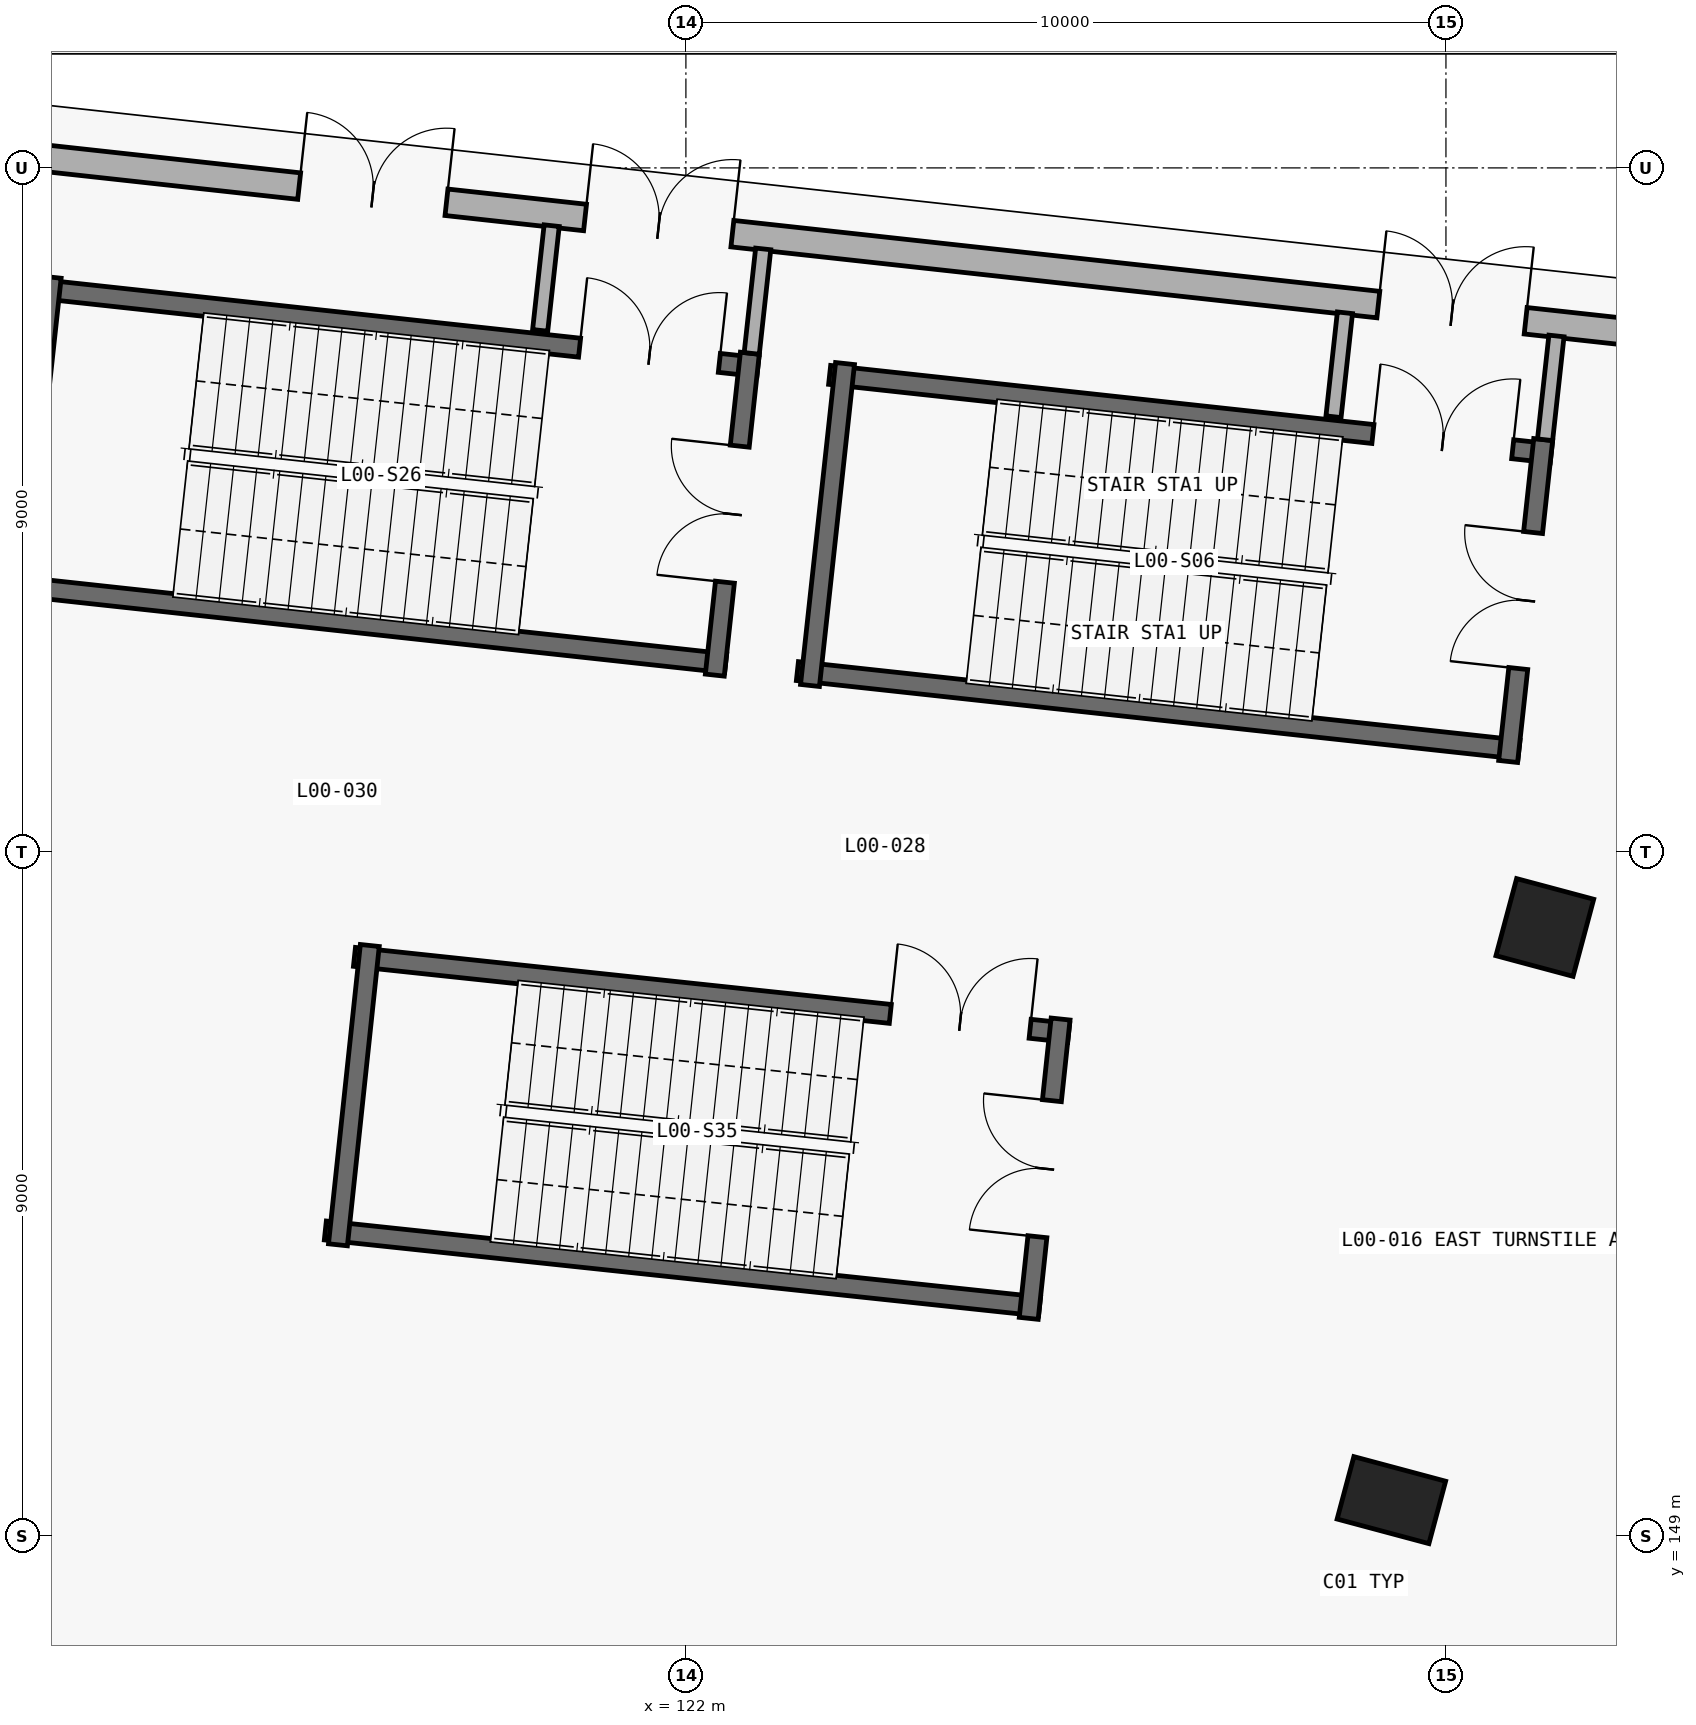
"""IFC4 building model, lengths in metres.
Left out: names, types, materials, properties, quantities, classifications, styles, units other than length and angle.
Written with IfcOpenShell. Run it as: python <this file> out.ifc"""

import sys

from ifc_helpers import new_model, si_unit, direction, frame, frame_2d, origin, origin_2d, place, context, subcontext, project, spatial, rectangle, extrude, element, fill, save


model = new_model("IFC4")
c1 = context("Model", 3, precision=1e-05, world=origin(), true_north=direction((0.0, 1.0)))
c2 = subcontext(c1, "Body", "Model", "MODEL_VIEW")
j1 = project(units=[si_unit("LENGTHUNIT", "METRE"), si_unit("PLANEANGLEUNIT", "RADIAN")], contexts=[c1])
p1 = place(None, origin())
s1 = spatial("IfcSite", under=j1, at=p1, CompositionType="ELEMENT")
p2 = place(p1, origin())
s2 = spatial("IfcBuilding", under=s1, at=p2, CompositionType="ELEMENT")
p3 = place(p2, origin())
s3 = spatial("IfcBuildingStorey", under=s2, at=p3, CompositionType="ELEMENT", Elevation=0.0)
p4 = place(p3, frame((131.282, 149.473, 0.0), z_axis=(0.0, 0.0, 1.0), x_axis=(0.258819045103, 0.965925826289, 0.0)))
e1 = element("IfcColumn", 1, at=p4, inside=s3, PredefinedType="COLUMN", context=c2, shape_type="SweptSolid", body=[
    extrude(rectangle(XDim=0.85, YDim=1.25, at=origin_2d()), origin(), (0.0, 0.0, 1.0), 5.4),
])
p5 = place(p3, frame((133.301, 157.007, 0.0), z_axis=(0.0, 0.0, 1.0), x_axis=(0.258819045103, 0.965925826289, 0.0)))
e2 = element("IfcColumn", 2, at=p5, inside=s3, PredefinedType="COLUMN", context=c2, shape_type="SweptSolid", body=[
    extrude(rectangle(XDim=1.05, YDim=1.05, at=origin_2d()), origin(), (0.0, 0.0, 1.0), 5.4),
])
p6 = place(p3, frame((112.525, 167.242, 0.0), z_axis=(0.0, 0.0, 1.0), x_axis=(0.994028735725, -0.10911861689, 0.0)))
e3 = element("IfcWall", 3, at=p6, inside=s3, PredefinedType="STANDARD", context=c2, shape_type="SweptSolid", body=[
    extrude(rectangle(XDim=22.452, YDim=0.35, at=frame_2d((11.226, 0.0))), origin(), (0.0, 0.0, 1.0), 4.165),
])
p7 = place(p6, frame((18.697, 0.0, 0.0)))
e4 = element("IfcOpeningElement", 4, at=p7, cuts=e3, PredefinedType="OPENING", context=c2, shape_type="SweptSolid", body=[
    extrude(rectangle(XDim=1.95, YDim=2.25, at=frame_2d((0.975, 1.125))), frame((0.0, 0.185, 0.0), z_axis=(0.0, -1.0, 0.0), x_axis=(1.0, 0.0, 0.0)), (0.0, 0.0, 1.0), 0.37),
])
p8 = place(p6, frame((8.197, 0.0, 0.0)))
e5 = element("IfcOpeningElement", 5, at=p8, cuts=e3, PredefinedType="OPENING", context=c2, shape_type="SweptSolid", body=[
    extrude(rectangle(XDim=1.95, YDim=2.25, at=frame_2d((0.975, 1.125))), frame((0.0, 0.185, 0.0), z_axis=(0.0, -1.0, 0.0), x_axis=(1.0, 0.0, 0.0)), (0.0, 0.0, 1.0), 0.37),
])
p9 = place(p6, frame((4.413, 0.0, 0.0)))
e6 = element("IfcOpeningElement", 6, at=p9, cuts=e3, PredefinedType="OPENING", context=c2, shape_type="SweptSolid", body=[
    extrude(rectangle(XDim=1.95, YDim=2.25, at=frame_2d((0.975, 1.125))), frame((0.0, 0.185, 0.0), z_axis=(0.0, -1.0, 0.0), x_axis=(1.0, 0.0, 0.0)), (0.0, 0.0, 1.0), 0.37),
])
p10 = place(p3, frame((123.891, 164.277, 0.0), z_axis=(0.0, 0.0, 1.0), x_axis=(0.994127555169, -0.108214620337, 0.0)))
e7 = element("IfcWall", 7, at=p10, inside=s3, PredefinedType="SHEAR", context=c2, shape_type="SweptSolid", body=[
    extrude(rectangle(XDim=9.55, YDim=0.25, at=frame_2d((4.775, 0.0))), origin(), (0.0, 0.0, 1.0), 5.1),
])
p11 = place(p10, frame((7.19, 0.0, 0.0)))
e8 = element("IfcOpeningElement", 8, at=p11, cuts=e7, PredefinedType="OPENING", context=c2, shape_type="SweptSolid", body=[
    extrude(rectangle(XDim=1.85, YDim=2.3, at=frame_2d((0.925, 1.15))), frame((0.0, 0.135, 0.0), z_axis=(0.0, -1.0, 0.0), x_axis=(1.0, 0.0, 0.0)), (0.0, 0.0, 1.0), 0.27),
])
p12 = place(p3, frame((123.467, 160.38, 0.0), z_axis=(0.0, 0.0, 1.0), x_axis=(0.994127555169, -0.108214620337, 0.0)))
e9 = element("IfcWall", 9, at=p12, inside=s3, PredefinedType="SHEAR", context=c2, shape_type="SweptSolid", body=[
    extrude(rectangle(XDim=9.55, YDim=0.25, at=frame_2d((4.775, 0.0))), origin(), (0.0, 0.0, 1.0), 5.1),
])
p13 = place(p3, frame((132.818, 159.191, 0.0), z_axis=(0.0, 0.0, 1.0), x_axis=(0.108198315262, 0.994129329903, 0.0)))
e10 = element("IfcWall", 10, at=p13, inside=s3, PredefinedType="SHEAR", context=c2, shape_type="SweptSolid", body=[
    extrude(rectangle(XDim=4.26, YDim=0.25, at=frame_2d((2.13, 0.0))), origin(), (0.0, 0.0, 1.0), 5.1),
])
p14 = place(p13, frame((1.23, 0.0, 0.0)))
e11 = element("IfcOpeningElement", 11, at=p14, cuts=e10, PredefinedType="OPENING", context=c2, shape_type="SweptSolid", body=[
    extrude(rectangle(XDim=1.8, YDim=2.25, at=frame_2d((0.9, 1.125))), frame((0.0, 0.135, 0.0), z_axis=(0.0, -1.0, 0.0), x_axis=(1.0, 0.0, 0.0)), (0.0, 0.0, 1.0), 0.27),
])
p15 = place(p3, frame((124.094, 164.426, 0.0), z_axis=(0.0, 0.0, 1.0), x_axis=(-0.108198315262, -0.994129329903, 0.0)))
e12 = element("IfcWall", 12, at=p15, inside=s3, PredefinedType="SHEAR", context=c2, shape_type="SweptSolid", body=[
    extrude(rectangle(XDim=4.26, YDim=0.25, at=frame_2d((2.13, 0.0))), origin(), (0.0, 0.0, 1.0), 5.1),
])
p16 = place(p3, frame((113.453, 165.413, 0.0), z_axis=(0.0, 0.0, 1.0), x_axis=(0.994127555169, -0.108214620337, 0.0)))
e13 = element("IfcWall", 13, at=p16, inside=s3, PredefinedType="SHEAR", context=c2, shape_type="SweptSolid", body=[
    extrude(rectangle(XDim=9.55, YDim=0.25, at=frame_2d((4.775, 0.0))), origin(), (0.0, 0.0, 1.0), 5.1),
])
p17 = place(p16, frame((7.19, 0.0, 0.0)))
e14 = element("IfcOpeningElement", 14, at=p17, cuts=e13, PredefinedType="OPENING", context=c2, shape_type="SweptSolid", body=[
    extrude(rectangle(XDim=1.85, YDim=2.3, at=frame_2d((0.925, 1.15))), frame((0.0, 0.135, 0.0), z_axis=(0.0, -1.0, 0.0), x_axis=(1.0, 0.0, 0.0)), (0.0, 0.0, 1.0), 0.27),
])
p18 = place(p3, frame((113.029, 161.516, 0.0), z_axis=(0.0, 0.0, 1.0), x_axis=(0.994127555169, -0.108214620337, 0.0)))
e15 = element("IfcWall", 15, at=p18, inside=s3, PredefinedType="SHEAR", context=c2, shape_type="SweptSolid", body=[
    extrude(rectangle(XDim=9.55, YDim=0.25, at=frame_2d((4.775, 0.0))), origin(), (0.0, 0.0, 1.0), 5.1),
])
p19 = place(p3, frame((122.38, 160.327, 0.0), z_axis=(0.0, 0.0, 1.0), x_axis=(0.108198315262, 0.994129329903, 0.0)))
e16 = element("IfcWall", 16, at=p19, inside=s3, PredefinedType="SHEAR", context=c2, shape_type="SweptSolid", body=[
    extrude(rectangle(XDim=4.26, YDim=0.25, at=frame_2d((2.13, 0.0))), origin(), (0.0, 0.0, 1.0), 5.1),
])
p20 = place(p19, frame((1.23, 0.0, 0.0)))
e17 = element("IfcOpeningElement", 17, at=p20, cuts=e16, PredefinedType="OPENING", context=c2, shape_type="SweptSolid", body=[
    extrude(rectangle(XDim=1.8, YDim=2.25, at=frame_2d((0.9, 1.125))), frame((0.0, 0.135, 0.0), z_axis=(0.0, -1.0, 0.0), x_axis=(1.0, 0.0, 0.0)), (0.0, 0.0, 1.0), 0.27),
])
p21 = place(p3, frame((113.656, 165.562, 0.0), z_axis=(0.0, 0.0, 1.0), x_axis=(-0.108198315262, -0.994129329903, 0.0)))
e18 = element("IfcWall", 18, at=p21, inside=s3, PredefinedType="SHEAR", context=c2, shape_type="SweptSolid", body=[
    extrude(rectangle(XDim=4.26, YDim=0.25, at=frame_2d((2.13, 0.0))), origin(), (0.0, 0.0, 1.0), 5.1),
])
p22 = place(p3, frame((117.639, 156.62, 0.0), z_axis=(0.0, 0.0, 1.0), x_axis=(0.994382608826, -0.105845298736, 0.0)))
e19 = element("IfcWall", 19, at=p22, inside=s3, PredefinedType="SHEAR", context=c2, shape_type="SweptSolid", body=[
    extrude(rectangle(XDim=9.45, YDim=0.25, at=frame_2d((4.725, 0.0))), origin(), (0.0, 0.0, 1.0), 5.1),
])
p23 = place(p22, frame((7.09, 0.0, 0.0)))
e20 = element("IfcOpeningElement", 20, at=p23, cuts=e19, PredefinedType="OPENING", context=c2, shape_type="SweptSolid", body=[
    extrude(rectangle(XDim=1.85, YDim=2.3, at=frame_2d((0.925, 1.15))), frame((0.0, 0.135, 0.0), z_axis=(0.0, -1.0, 0.0), x_axis=(1.0, 0.0, 0.0)), (0.0, 0.0, 1.0), 0.27),
])
p24 = place(p3, frame((117.256, 153.021, 0.0), z_axis=(0.0, 0.0, 1.0), x_axis=(0.994382608826, -0.105845298736, 0.0)))
e21 = element("IfcWall", 21, at=p24, inside=s3, PredefinedType="SHEAR", context=c2, shape_type="SweptSolid", body=[
    extrude(rectangle(XDim=9.45, YDim=0.25, at=frame_2d((4.725, 0.0))), origin(), (0.0, 0.0, 1.0), 5.1),
])
p25 = place(p3, frame((126.51, 151.865, 0.0), z_axis=(0.0, 0.0, 1.0), x_axis=(0.105856095603, 0.994381459513, 0.0)))
e22 = element("IfcWall", 22, at=p25, inside=s3, PredefinedType="SHEAR", context=c2, shape_type="SweptSolid", body=[
    extrude(rectangle(XDim=3.96, YDim=0.25, at=frame_2d((1.98, 0.0))), origin(), (0.0, 0.0, 1.0), 5.1),
])
p26 = place(p25, frame((1.08, 0.0, 0.0)))
e23 = element("IfcOpeningElement", 23, at=p26, cuts=e22, PredefinedType="OPENING", context=c2, shape_type="SweptSolid", body=[
    extrude(rectangle(XDim=1.8, YDim=2.25, at=frame_2d((0.9, 1.125))), frame((0.0, 0.135, 0.0), z_axis=(0.0, -1.0, 0.0), x_axis=(1.0, 0.0, 0.0)), (0.0, 0.0, 1.0), 0.27),
])
p27 = place(p3, frame((117.841, 156.77, 0.0), z_axis=(0.0, 0.0, 1.0), x_axis=(-0.105856095603, -0.994381459513, 0.0)))
e24 = element("IfcWall", 24, at=p27, inside=s3, PredefinedType="SHEAR", context=c2, shape_type="SweptSolid", body=[
    extrude(rectangle(XDim=3.96, YDim=0.25, at=frame_2d((1.98, 0.0))), origin(), (0.0, 0.0, 1.0), 5.1),
])
p28 = place(p3, frame((133.304, 163.423, 0.0), z_axis=(0.0, 0.0, 1.0), x_axis=(0.109105210456, 0.994030207313, 0.0)))
e25 = element("IfcWall", 25, at=p28, inside=s3, PredefinedType="PARTITIONING", context=c2, shape_type="SweptSolid", body=[
    extrude(rectangle(XDim=1.374, YDim=0.2, at=frame_2d((0.687, 0.0))), origin(), (0.0, 0.0, 1.0), 4.165),
])
p29 = place(p3, frame((130.521, 163.726, 0.0), z_axis=(0.0, 0.0, 1.0), x_axis=(0.109301909368, 0.994008597854, 0.0)))
e26 = element("IfcWall", 26, at=p29, inside=s3, PredefinedType="PARTITIONING", context=c2, shape_type="SweptSolid", body=[
    extrude(rectangle(XDim=1.376, YDim=0.2, at=frame_2d((0.688, 0.0))), origin(), (0.0, 0.0, 1.0), 4.165),
])
p30 = place(p3, frame((122.866, 164.559, 0.0), z_axis=(0.0, 0.0, 1.0), x_axis=(0.109094546517, 0.994031377734, 0.0)))
e27 = element("IfcWall", 27, at=p30, inside=s3, PredefinedType="PARTITIONING", context=c2, shape_type="SweptSolid", body=[
    extrude(rectangle(XDim=1.383, YDim=0.2, at=frame_2d((0.691, 0.0))), origin(), (0.0, 0.0, 1.0), 4.165),
])
p31 = place(p3, frame((120.083, 164.862, 0.0), z_axis=(0.0, 0.0, 1.0), x_axis=(0.109213425596, 0.994018323609, 0.0)))
e28 = element("IfcWall", 28, at=p31, inside=s3, PredefinedType="PARTITIONING", context=c2, shape_type="SweptSolid", body=[
    extrude(rectangle(XDim=1.386, YDim=0.2, at=frame_2d((0.693, 0.0))), origin(), (0.0, 0.0, 1.0), 4.165),
])
p32 = place(p7, origin())
e29 = element("IfcDoor", 29, at=p32, inside=s3, OperationType="DOUBLE_DOOR_SINGLE_SWING", PredefinedType="DOOR", context=c2, shape_type="SweptSolid", body=[
    extrude(rectangle(XDim=1.95, YDim=2.25, at=frame_2d((0.975, 1.125))), frame((0.0, 0.025, 0.0), z_axis=(0.0, -1.0, 0.0), x_axis=(1.0, 0.0, 0.0)), (0.0, 0.0, 1.0), 0.05),
])
fill(e4, e29)
p33 = place(p8, origin())
e30 = element("IfcDoor", 30, at=p33, inside=s3, OperationType="DOUBLE_DOOR_SINGLE_SWING", PredefinedType="DOOR", context=c2, shape_type="SweptSolid", body=[
    extrude(rectangle(XDim=1.95, YDim=2.25, at=frame_2d((0.975, 1.125))), frame((0.0, 0.025, 0.0), z_axis=(0.0, -1.0, 0.0), x_axis=(1.0, 0.0, 0.0)), (0.0, 0.0, 1.0), 0.05),
])
fill(e5, e30)
p34 = place(p9, origin())
e31 = element("IfcDoor", 31, at=p34, inside=s3, OperationType="DOUBLE_DOOR_SINGLE_SWING", PredefinedType="DOOR", context=c2, shape_type="SweptSolid", body=[
    extrude(rectangle(XDim=1.95, YDim=2.25, at=frame_2d((0.975, 1.125))), frame((0.0, 0.025, 0.0), z_axis=(0.0, -1.0, 0.0), x_axis=(1.0, 0.0, 0.0)), (0.0, 0.0, 1.0), 0.05),
])
fill(e6, e31)
p35 = place(p14, origin())
e32 = element("IfcDoor", 32, at=p35, inside=s3, OperationType="DOUBLE_DOOR_SINGLE_SWING", PredefinedType="DOOR", context=c2, shape_type="SweptSolid", body=[
    extrude(rectangle(XDim=1.8, YDim=2.25, at=frame_2d((0.9, 1.125))), frame((0.0, 0.025, 0.0), z_axis=(0.0, -1.0, 0.0), x_axis=(1.0, 0.0, 0.0)), (0.0, 0.0, 1.0), 0.05),
])
fill(e11, e32)
p36 = place(p11, origin())
e33 = element("IfcDoor", 33, at=p36, inside=s3, OperationType="DOUBLE_DOOR_SINGLE_SWING", PredefinedType="DOOR", context=c2, shape_type="SweptSolid", body=[
    extrude(rectangle(XDim=1.85, YDim=2.3, at=frame_2d((0.925, 1.15))), frame((0.0, 0.025, 0.0), z_axis=(0.0, -1.0, 0.0), x_axis=(1.0, 0.0, 0.0)), (0.0, 0.0, 1.0), 0.05),
])
fill(e8, e33)
p37 = place(p20, origin())
e34 = element("IfcDoor", 34, at=p37, inside=s3, OperationType="DOUBLE_DOOR_SINGLE_SWING", PredefinedType="DOOR", context=c2, shape_type="SweptSolid", body=[
    extrude(rectangle(XDim=1.8, YDim=2.25, at=frame_2d((0.9, 1.125))), frame((0.0, 0.025, 0.0), z_axis=(0.0, -1.0, 0.0), x_axis=(1.0, 0.0, 0.0)), (0.0, 0.0, 1.0), 0.05),
])
fill(e17, e34)
p38 = place(p17, origin())
e35 = element("IfcDoor", 35, at=p38, inside=s3, OperationType="DOUBLE_DOOR_SINGLE_SWING", PredefinedType="DOOR", context=c2, shape_type="SweptSolid", body=[
    extrude(rectangle(XDim=1.85, YDim=2.3, at=frame_2d((0.925, 1.15))), frame((0.0, 0.025, 0.0), z_axis=(0.0, -1.0, 0.0), x_axis=(1.0, 0.0, 0.0)), (0.0, 0.0, 1.0), 0.05),
])
fill(e14, e35)
p39 = place(p26, origin())
e36 = element("IfcDoor", 36, at=p39, inside=s3, OperationType="DOUBLE_DOOR_SINGLE_SWING", PredefinedType="DOOR", context=c2, shape_type="SweptSolid", body=[
    extrude(rectangle(XDim=1.8, YDim=2.25, at=frame_2d((0.9, 1.125))), frame((0.0, 0.025, 0.0), z_axis=(0.0, -1.0, 0.0), x_axis=(1.0, 0.0, 0.0)), (0.0, 0.0, 1.0), 0.05),
])
fill(e23, e36)
p40 = place(p23, origin())
e37 = element("IfcDoor", 37, at=p40, inside=s3, OperationType="DOUBLE_DOOR_SINGLE_SWING", PredefinedType="DOOR", context=c2, shape_type="SweptSolid", body=[
    extrude(rectangle(XDim=1.85, YDim=2.3, at=frame_2d((0.925, 1.15))), frame((0.0, 0.025, 0.0), z_axis=(0.0, -1.0, 0.0), x_axis=(1.0, 0.0, 0.0)), (0.0, 0.0, 1.0), 0.05),
])
fill(e20, e37)
save(model, sys.argv[1])
